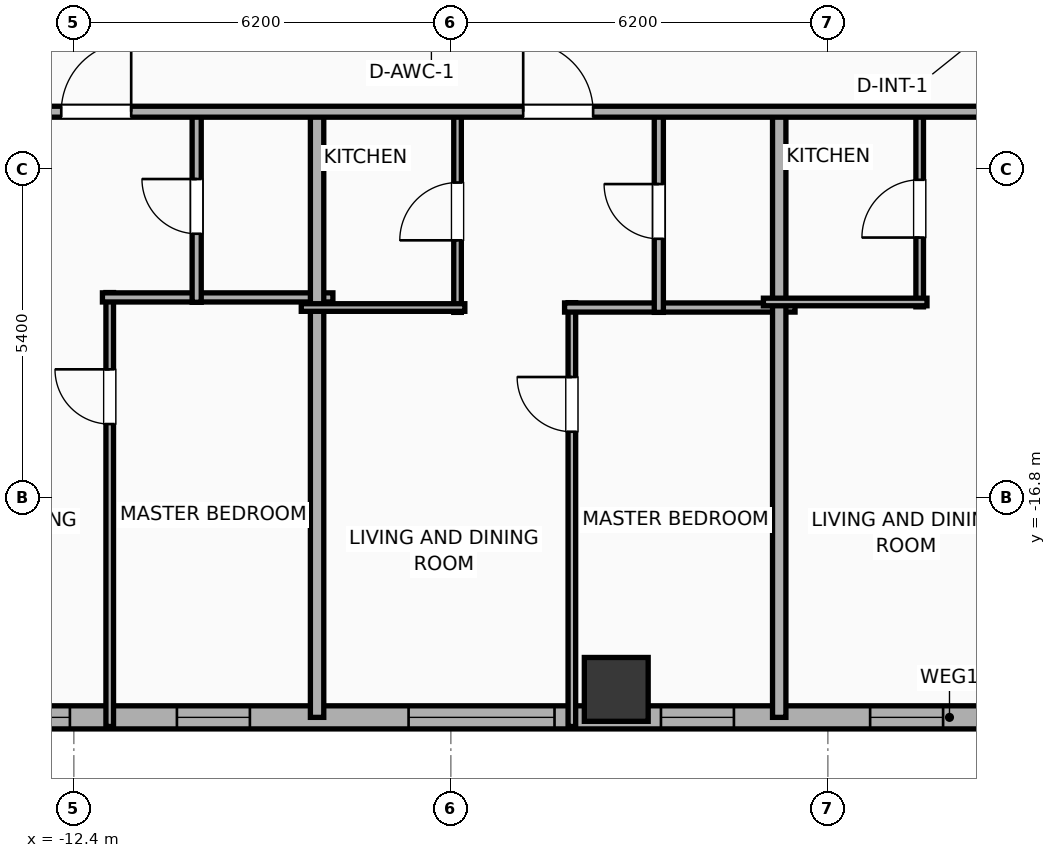
"""IFC4 building model, lengths in metres.
Left out: names, types, materials, properties, quantities, classifications, styles, units other than length and angle.
Written with IfcOpenShell. Run it as: python <this file> out.ifc"""

import sys

from ifc_helpers import new_model, si_unit, direction, frame, frame_2d, origin, origin_2d, place, context, subcontext, project, spatial, rectangle, hollow_rectangle, extrude, element, fill, save


model = new_model("IFC4")
c1 = context("Model", 3, precision=1e-05, world=origin(), true_north=direction((0.0, 1.0)))
c2 = subcontext(c1, "Body", "Model", "MODEL_VIEW")
j1 = project(units=[si_unit("LENGTHUNIT", "METRE"), si_unit("PLANEANGLEUNIT", "RADIAN")], contexts=[c1])
p1 = place(None, origin())
s1 = spatial("IfcSite", under=j1, at=p1, CompositionType="ELEMENT")
p2 = place(p1, origin())
s2 = spatial("IfcBuilding", under=s1, at=p2, CompositionType="ELEMENT")
p3 = place(p2, frame((0.0, 0.0, 93.6)))
s3 = spatial("IfcBuildingStorey", under=s2, at=p3, CompositionType="ELEMENT", Elevation=93.6)
p4 = place(p3, frame((-3.48, -19.95, 0.0), z_axis=(0.0, 0.0, 1.0), x_axis=(1.0, 0.0, 0.0)))
e1 = element("IfcColumn", 1, at=p4, inside=s3, PredefinedType="COLUMN", context=c2, shape_type="SweptSolid", body=[
    extrude(hollow_rectangle(XDim=1.05, YDim=1.05, WallThickness=0.036, at=origin_2d()), origin(), (0.0, 0.0, 1.0), 3.9),
])
p5 = place(p3, frame((29.381, -20.41, 0.0), z_axis=(0.0, 0.0, 1.0), x_axis=(-1.0, 0.0, 0.0)))
e2 = element("IfcWall", 2, at=p5, inside=s3, PredefinedType="ELEMENTEDWALL", context=c2, shape_type="SweptSolid", body=[
    extrude(rectangle(XDim=54.763, YDim=0.38, at=frame_2d((27.381, 0.0))), origin(), (0.0, 0.0, 1.0), 3.65),
])
p6 = place(p5, frame((4.795, 0.0, 0.75)))
e3 = element("IfcOpeningElement", 3, at=p6, cuts=e2, PredefinedType="OPENING", context=c2, shape_type="SweptSolid", body=[
    extrude(rectangle(XDim=2.4, YDim=2.1, at=frame_2d((1.2, 1.05))), frame((0.0, 0.2, 0.0), z_axis=(0.0, -1.0, 0.0), x_axis=(1.0, 0.0, 0.0)), (0.0, 0.0, 1.0), 0.4),
])
p7 = place(p5, frame((33.877, 0.0, 0.75)))
e4 = element("IfcOpeningElement", 4, at=p7, cuts=e2, PredefinedType="OPENING", context=c2, shape_type="SweptSolid", body=[
    extrude(rectangle(XDim=2.4, YDim=2.1, at=frame_2d((1.2, 1.05))), frame((0.0, 0.2, 0.0), z_axis=(0.0, -1.0, 0.0), x_axis=(1.0, 0.0, 0.0)), (0.0, 0.0, 1.0), 0.4),
])
p8 = place(p5, frame((45.867, 0.0, 0.75)))
e5 = element("IfcOpeningElement", 5, at=p8, cuts=e2, PredefinedType="OPENING", context=c2, shape_type="SweptSolid", body=[
    extrude(rectangle(XDim=2.4, YDim=2.1, at=frame_2d((1.2, 1.05))), frame((0.0, 0.2, 0.0), z_axis=(0.0, -1.0, 0.0), x_axis=(1.0, 0.0, 0.0)), (0.0, 0.0, 1.0), 0.4),
])
p9 = place(p5, frame((53.122, 0.0, 0.75)))
e6 = element("IfcOpeningElement", 6, at=p9, cuts=e2, PredefinedType="OPENING", context=c2, shape_type="SweptSolid", body=[
    extrude(rectangle(XDim=0.85, YDim=2.05, at=frame_2d((0.425, 1.025))), frame((0.0, 0.2, 0.0), z_axis=(0.0, -1.0, 0.0), x_axis=(1.0, 0.0, 0.0)), (0.0, 0.0, 1.0), 0.4),
])
p10 = place(p5, frame((50.286, 0.0, 0.75)))
e7 = element("IfcOpeningElement", 7, at=p10, cuts=e2, PredefinedType="OPENING", context=c2, shape_type="SweptSolid", body=[
    extrude(rectangle(XDim=1.2, YDim=2.05, at=frame_2d((0.6, 1.025))), frame((0.0, 0.2, 0.0), z_axis=(0.0, -1.0, 0.0), x_axis=(1.0, 0.0, 0.0)), (0.0, 0.0, 1.0), 0.4),
])
p11 = place(p5, frame((41.846, 0.0, 0.75)))
e8 = element("IfcOpeningElement", 8, at=p11, cuts=e2, PredefinedType="OPENING", context=c2, shape_type="SweptSolid", body=[
    extrude(rectangle(XDim=1.2, YDim=2.05, at=frame_2d((0.6, 1.025))), frame((0.0, 0.2, 0.0), z_axis=(0.0, -1.0, 0.0), x_axis=(1.0, 0.0, 0.0)), (0.0, 0.0, 1.0), 0.4),
])
p12 = place(p5, frame((38.886, 0.0, 0.75)))
e9 = element("IfcOpeningElement", 9, at=p12, cuts=e2, PredefinedType="OPENING", context=c2, shape_type="SweptSolid", body=[
    extrude(rectangle(XDim=1.2, YDim=2.05, at=frame_2d((0.6, 1.025))), frame((0.0, 0.2, 0.0), z_axis=(0.0, -1.0, 0.0), x_axis=(1.0, 0.0, 0.0)), (0.0, 0.0, 1.0), 0.4),
])
p13 = place(p5, frame((30.926, 0.0, 0.75)))
e10 = element("IfcOpeningElement", 10, at=p13, cuts=e2, PredefinedType="OPENING", context=c2, shape_type="SweptSolid", body=[
    extrude(rectangle(XDim=1.2, YDim=2.05, at=frame_2d((0.6, 1.025))), frame((0.0, 0.2, 0.0), z_axis=(0.0, -1.0, 0.0), x_axis=(1.0, 0.0, 0.0)), (0.0, 0.0, 1.0), 0.4),
])
p14 = place(p5, frame((27.486, 0.0, 0.75)))
e11 = element("IfcOpeningElement", 11, at=p14, cuts=e2, PredefinedType="OPENING", context=c2, shape_type="SweptSolid", body=[
    extrude(rectangle(XDim=1.2, YDim=2.05, at=frame_2d((0.6, 1.025))), frame((0.0, 0.2, 0.0), z_axis=(0.0, -1.0, 0.0), x_axis=(1.0, 0.0, 0.0)), (0.0, 0.0, 1.0), 0.4),
])
p15 = place(p5, frame((23.686, 0.0, 0.75)))
e12 = element("IfcOpeningElement", 12, at=p15, cuts=e2, PredefinedType="OPENING", context=c2, shape_type="SweptSolid", body=[
    extrude(rectangle(XDim=1.2, YDim=2.05, at=frame_2d((0.6, 1.025))), frame((0.0, 0.2, 0.0), z_axis=(0.0, -1.0, 0.0), x_axis=(1.0, 0.0, 0.0)), (0.0, 0.0, 1.0), 0.4),
])
p16 = place(p5, frame((19.886, 0.0, 0.75)))
e13 = element("IfcOpeningElement", 13, at=p16, cuts=e2, PredefinedType="OPENING", context=c2, shape_type="SweptSolid", body=[
    extrude(rectangle(XDim=1.2, YDim=2.05, at=frame_2d((0.6, 1.025))), frame((0.0, 0.2, 0.0), z_axis=(0.0, -1.0, 0.0), x_axis=(1.0, 0.0, 0.0)), (0.0, 0.0, 1.0), 0.4),
])
p17 = place(p5, frame((16.086, 0.0, 0.75)))
e14 = element("IfcOpeningElement", 14, at=p17, cuts=e2, PredefinedType="OPENING", context=c2, shape_type="SweptSolid", body=[
    extrude(rectangle(XDim=1.2, YDim=2.05, at=frame_2d((0.6, 1.025))), frame((0.0, 0.2, 0.0), z_axis=(0.0, -1.0, 0.0), x_axis=(1.0, 0.0, 0.0)), (0.0, 0.0, 1.0), 0.4),
])
p18 = place(p5, frame((12.286, 0.0, 0.75)))
e15 = element("IfcOpeningElement", 15, at=p18, cuts=e2, PredefinedType="OPENING", context=c2, shape_type="SweptSolid", body=[
    extrude(rectangle(XDim=1.2, YDim=2.05, at=frame_2d((0.6, 1.025))), frame((0.0, 0.2, 0.0), z_axis=(0.0, -1.0, 0.0), x_axis=(1.0, 0.0, 0.0)), (0.0, 0.0, 1.0), 0.4),
])
p19 = place(p5, frame((8.486, 0.0, 0.75)))
e16 = element("IfcOpeningElement", 16, at=p19, cuts=e2, PredefinedType="OPENING", context=c2, shape_type="SweptSolid", body=[
    extrude(rectangle(XDim=1.2, YDim=2.05, at=frame_2d((0.6, 1.025))), frame((0.0, 0.2, 0.0), z_axis=(0.0, -1.0, 0.0), x_axis=(1.0, 0.0, 0.0)), (0.0, 0.0, 1.0), 0.4),
])
p20 = place(p5, frame((2.277, 0.0, 0.75)))
e17 = element("IfcOpeningElement", 17, at=p20, cuts=e2, PredefinedType="OPENING", context=c2, shape_type="SweptSolid", body=[
    extrude(rectangle(XDim=1.2, YDim=2.05, at=frame_2d((0.6, 1.025))), frame((0.0, 0.2, 0.0), z_axis=(0.0, -1.0, 0.0), x_axis=(1.0, 0.0, 0.0)), (0.0, 0.0, 1.0), 0.4),
])
p21 = place(p5, frame((1.071, 0.0, 0.75)))
e18 = element("IfcOpeningElement", 18, at=p21, cuts=e2, PredefinedType="OPENING", context=c2, shape_type="SweptSolid", body=[
    extrude(rectangle(XDim=0.52, YDim=2.05, at=frame_2d((0.26, 1.025))), frame((0.0, 0.2, 0.0), z_axis=(0.0, -1.0, 0.0), x_axis=(1.0, 0.0, 0.0)), (0.0, 0.0, 1.0), 0.4),
])
p22 = place(p3, frame((-11.81, -20.56, 0.0), z_axis=(0.0, 0.0, 1.0), x_axis=(0.0, 1.0, 0.0)))
e19 = element("IfcWall", 19, at=p22, inside=s3, PredefinedType="PARTITIONING", context=c2, shape_type="SweptSolid", body=[
    extrude(rectangle(XDim=7.136, YDim=0.125, at=frame_2d((3.568, 0.0))), origin(), (0.0, 0.0, 1.0), 3.65),
])
p23 = place(p22, frame((4.973, 0.0, 0.0)))
e20 = element("IfcOpeningElement", 20, at=p23, cuts=e19, PredefinedType="OPENING", context=c2, shape_type="SweptSolid", body=[
    extrude(rectangle(XDim=0.9, YDim=2.05, at=frame_2d((0.45, 1.025))), frame((0.0, 0.073, 0.0), z_axis=(0.0, -1.0, 0.0), x_axis=(1.0, 0.0, 0.0)), (0.0, 0.0, 1.0), 0.145),
])
p24 = place(p3, frame((-11.93, -13.504, 0.0), z_axis=(0.0, 0.0, 1.0), x_axis=(1.0, 0.0, 0.0)))
e21 = element("IfcWall", 21, at=p24, inside=s3, PredefinedType="PLUMBINGWALL", context=c2, shape_type="SweptSolid", body=[
    extrude(rectangle(XDim=3.79, YDim=0.15, at=frame_2d((1.895, 0.0))), origin(), (0.0, 0.0, 1.0), 3.65),
])
p25 = place(p3, frame((-10.38, -13.584, 0.0), z_axis=(0.0, 0.0, 1.0), x_axis=(0.0, 1.0, 0.0)))
e22 = element("IfcWall", 22, at=p25, inside=s3, PredefinedType="PLUMBINGWALL", context=c2, shape_type="SweptSolid", body=[
    extrude(rectangle(XDim=3.154, YDim=0.15, at=frame_2d((1.577, 0.0))), origin(), (0.0, 0.0, 1.0), 3.65),
])
p26 = place(p25, frame((1.127, 0.0, 0.0)))
e23 = element("IfcOpeningElement", 23, at=p26, cuts=e22, PredefinedType="OPENING", context=c2, shape_type="SweptSolid", body=[
    extrude(rectangle(XDim=0.9, YDim=2.05, at=frame_2d((0.45, 1.025))), frame((0.0, 0.085, 0.0), z_axis=(0.0, -1.0, 0.0), x_axis=(1.0, 0.0, 0.0)), (0.0, 0.0, 1.0), 0.17),
])
p27 = place(p3, frame((-8.4, -20.41, 0.0), z_axis=(0.0, 0.0, 1.0), x_axis=(0.0, 1.0, 0.0)))
e24 = element("IfcWall", 24, at=p27, inside=s3, PredefinedType="PARTITIONING", context=c2, shape_type="SweptSolid", body=[
    extrude(rectangle(XDim=10.04, YDim=0.22, at=frame_2d((5.02, 0.0))), origin(), (0.0, 0.0, 1.0), 3.65),
])
p28 = place(p3, frame((-4.21, -20.56, 0.0), z_axis=(0.0, 0.0, 1.0), x_axis=(0.0, 1.0, 0.0)))
e25 = element("IfcWall", 25, at=p28, inside=s3, PredefinedType="PARTITIONING", context=c2, shape_type="SweptSolid", body=[
    extrude(rectangle(XDim=6.97, YDim=0.125, at=frame_2d((3.485, 0.0))), origin(), (0.0, 0.0, 1.0), 3.65),
])
p29 = place(p28, frame((4.847, 0.0, 0.0)))
e26 = element("IfcOpeningElement", 26, at=p29, cuts=e25, PredefinedType="OPENING", context=c2, shape_type="SweptSolid", body=[
    extrude(rectangle(XDim=0.9, YDim=2.05, at=frame_2d((0.45, 1.025))), frame((0.0, 0.073, 0.0), z_axis=(0.0, -1.0, 0.0), x_axis=(1.0, 0.0, 0.0)), (0.0, 0.0, 1.0), 0.145),
])
p30 = place(p3, frame((-4.33, -13.67, 0.0), z_axis=(0.0, 0.0, 1.0), x_axis=(1.0, 0.0, 0.0)))
e27 = element("IfcWall", 27, at=p30, inside=s3, PredefinedType="PLUMBINGWALL", context=c2, shape_type="SweptSolid", body=[
    extrude(rectangle(XDim=3.79, YDim=0.15, at=frame_2d((1.895, 0.0))), origin(), (0.0, 0.0, 1.0), 3.65),
])
p31 = place(p3, frame((-6.09, -13.75, 0.0), z_axis=(0.0, 0.0, 1.0), x_axis=(0.0, 1.0, 0.0)))
e28 = element("IfcWall", 28, at=p31, inside=s3, PredefinedType="PARTITIONING", context=c2, shape_type="SweptSolid", body=[
    extrude(rectangle(XDim=3.32, YDim=0.125, at=frame_2d((1.66, 0.0))), origin(), (0.0, 0.0, 1.0), 3.65),
])
p32 = place(p31, frame((1.185, 0.0, 0.0)))
e29 = element("IfcOpeningElement", 29, at=p32, cuts=e28, PredefinedType="OPENING", context=c2, shape_type="SweptSolid", body=[
    extrude(rectangle(XDim=0.95, YDim=2.05, at=frame_2d((0.475, 1.025))), frame((0.0, 0.073, 0.0), z_axis=(0.0, -1.0, 0.0), x_axis=(1.0, 0.0, 0.0)), (0.0, 0.0, 1.0), 0.145),
])
p33 = place(p3, frame((-8.66, -13.67, 0.0), z_axis=(0.0, 0.0, 1.0), x_axis=(1.0, 0.0, 0.0)))
e30 = element("IfcWall", 30, at=p33, inside=s3, PredefinedType="PARTITIONING", context=c2, shape_type="SweptSolid", body=[
    extrude(rectangle(XDim=2.69, YDim=0.125, at=frame_2d((1.345, 0.0))), origin(), (0.0, 0.0, 1.0), 3.65),
])
p34 = place(p3, frame((-2.78, -13.75, 0.0), z_axis=(0.0, 0.0, 1.0), x_axis=(0.0, 1.0, 0.0)))
e31 = element("IfcWall", 31, at=p34, inside=s3, PredefinedType="PLUMBINGWALL", context=c2, shape_type="SweptSolid", body=[
    extrude(rectangle(XDim=3.32, YDim=0.15, at=frame_2d((1.66, 0.0))), origin(), (0.0, 0.0, 1.0), 3.65),
])
p35 = place(p34, frame((1.21, 0.0, 0.0)))
e32 = element("IfcOpeningElement", 32, at=p35, cuts=e31, PredefinedType="OPENING", context=c2, shape_type="SweptSolid", body=[
    extrude(rectangle(XDim=0.9, YDim=2.05, at=frame_2d((0.45, 1.025))), frame((0.0, 0.085, 0.0), z_axis=(0.0, -1.0, 0.0), x_axis=(1.0, 0.0, 0.0)), (0.0, 0.0, 1.0), 0.17),
])
p36 = place(p3, frame((-0.8, -20.41, 0.0), z_axis=(0.0, 0.0, 1.0), x_axis=(0.0, 1.0, 0.0)))
e33 = element("IfcWall", 33, at=p36, inside=s3, PredefinedType="PARTITIONING", context=c2, shape_type="SweptSolid", body=[
    extrude(rectangle(XDim=10.04, YDim=0.22, at=frame_2d((5.02, 0.0))), origin(), (0.0, 0.0, 1.0), 3.65),
])
p37 = place(p3, frame((1.51, -13.659, 0.0), z_axis=(0.0, 0.0, 1.0), x_axis=(0.0, 1.0, 0.0)))
e34 = element("IfcWall", 34, at=p37, inside=s3, PredefinedType="PARTITIONING", context=c2, shape_type="SweptSolid", body=[
    extrude(rectangle(XDim=3.229, YDim=0.125, at=frame_2d((1.615, 0.0))), origin(), (0.0, 0.0, 1.0), 3.65),
])
p38 = place(p37, frame((1.139, 0.0, 0.0)))
e35 = element("IfcOpeningElement", 35, at=p38, cuts=e34, PredefinedType="OPENING", context=c2, shape_type="SweptSolid", body=[
    extrude(rectangle(XDim=0.95, YDim=2.05, at=frame_2d((0.475, 1.025))), frame((0.0, 0.073, 0.0), z_axis=(0.0, -1.0, 0.0), x_axis=(1.0, 0.0, 0.0)), (0.0, 0.0, 1.0), 0.145),
])
p39 = place(p3, frame((-1.06, -13.579, 0.0), z_axis=(0.0, 0.0, 1.0), x_axis=(1.0, 0.0, 0.0)))
e36 = element("IfcWall", 36, at=p39, inside=s3, PredefinedType="PARTITIONING", context=c2, shape_type="SweptSolid", body=[
    extrude(rectangle(XDim=2.69, YDim=0.125, at=frame_2d((1.345, 0.0))), origin(), (0.0, 0.0, 1.0), 3.65),
])
p40 = place(p3, frame((-29.21, -10.45, 0.0), z_axis=(0.0, 0.0, 1.0), x_axis=(1.0, 0.0, 0.0)))
e37 = element("IfcWall", 37, at=p40, inside=s3, PredefinedType="PARTITIONING", context=c2, shape_type="SweptSolid", body=[
    extrude(rectangle(XDim=62.42, YDim=0.18, at=frame_2d((31.21, 0.0))), origin(), (0.0, 0.0, 1.0), 3.65),
])
p41 = place(p40, frame((2.502, 0.0, 0.0)))
e38 = element("IfcOpeningElement", 38, at=p41, cuts=e37, PredefinedType="OPENING", context=c2, shape_type="SweptSolid", body=[
    extrude(rectangle(XDim=0.9, YDim=2.05, at=frame_2d((0.45, 1.025))), frame((0.0, 0.1, 0.0), z_axis=(0.0, -1.0, 0.0), x_axis=(1.0, 0.0, 0.0)), (0.0, 0.0, 1.0), 0.2),
])
p42 = place(p40, frame((9.0, 0.0, 0.0)))
e39 = element("IfcOpeningElement", 39, at=p42, cuts=e37, PredefinedType="OPENING", context=c2, shape_type="SweptSolid", body=[
    extrude(rectangle(XDim=1.15, YDim=2.05, at=frame_2d((0.575, 1.025))), frame((0.0, 0.1, 0.0), z_axis=(0.0, -1.0, 0.0), x_axis=(1.0, 0.0, 0.0)), (0.0, 0.0, 1.0), 0.2),
])
p43 = place(p40, frame((16.603, 0.0, 0.0)))
e40 = element("IfcOpeningElement", 40, at=p43, cuts=e37, PredefinedType="OPENING", context=c2, shape_type="SweptSolid", body=[
    extrude(rectangle(XDim=1.15, YDim=2.05, at=frame_2d((0.575, 1.025))), frame((0.0, 0.1, 0.0), z_axis=(0.0, -1.0, 0.0), x_axis=(1.0, 0.0, 0.0)), (0.0, 0.0, 1.0), 0.2),
])
p44 = place(p40, frame((24.199, 0.0, 0.0)))
e41 = element("IfcOpeningElement", 41, at=p44, cuts=e37, PredefinedType="OPENING", context=c2, shape_type="SweptSolid", body=[
    extrude(rectangle(XDim=1.15, YDim=2.05, at=frame_2d((0.575, 1.025))), frame((0.0, 0.1, 0.0), z_axis=(0.0, -1.0, 0.0), x_axis=(1.0, 0.0, 0.0)), (0.0, 0.0, 1.0), 0.2),
])
p45 = place(p40, frame((31.802, 0.0, 0.0)))
e42 = element("IfcOpeningElement", 42, at=p45, cuts=e37, PredefinedType="OPENING", context=c2, shape_type="SweptSolid", body=[
    extrude(rectangle(XDim=1.15, YDim=2.05, at=frame_2d((0.575, 1.025))), frame((0.0, 0.1, 0.0), z_axis=(0.0, -1.0, 0.0), x_axis=(1.0, 0.0, 0.0)), (0.0, 0.0, 1.0), 0.2),
])
p46 = place(p40, frame((39.399, 0.0, 0.0)))
e43 = element("IfcOpeningElement", 43, at=p46, cuts=e37, PredefinedType="OPENING", context=c2, shape_type="SweptSolid", body=[
    extrude(rectangle(XDim=1.15, YDim=2.05, at=frame_2d((0.575, 1.025))), frame((0.0, 0.1, 0.0), z_axis=(0.0, -1.0, 0.0), x_axis=(1.0, 0.0, 0.0)), (0.0, 0.0, 1.0), 0.2),
])
p47 = place(p40, frame((47.001, 0.0, 0.0)))
e44 = element("IfcOpeningElement", 44, at=p47, cuts=e37, PredefinedType="OPENING", context=c2, shape_type="SweptSolid", body=[
    extrude(rectangle(XDim=1.15, YDim=2.05, at=frame_2d((0.575, 1.025))), frame((0.0, 0.1, 0.0), z_axis=(0.0, -1.0, 0.0), x_axis=(1.0, 0.0, 0.0)), (0.0, 0.0, 1.0), 0.2),
])
p48 = place(p40, frame((52.363, 0.0, 0.0)))
e45 = element("IfcOpeningElement", 45, at=p48, cuts=e37, PredefinedType="OPENING", context=c2, shape_type="SweptSolid", body=[
    extrude(rectangle(XDim=1.15, YDim=2.05, at=frame_2d((0.575, 1.025))), frame((0.0, 0.1, 0.0), z_axis=(0.0, -1.0, 0.0), x_axis=(1.0, 0.0, 0.0)), (0.0, 0.0, 1.0), 0.2),
])
p49 = place(p40, frame((59.386, 0.0, 0.0)))
e46 = element("IfcOpeningElement", 46, at=p49, cuts=e37, PredefinedType="OPENING", context=c2, shape_type="SweptSolid", body=[
    extrude(rectangle(XDim=0.9, YDim=2.05, at=frame_2d((0.45, 1.025))), frame((0.0, 0.1, 0.0), z_axis=(0.0, -1.0, 0.0), x_axis=(1.0, 0.0, 0.0)), (0.0, 0.0, 1.0), 0.2),
])
p50 = place(p7, origin())
e47 = element("IfcWindow", 47, at=p50, inside=s3, PartitioningType="SINGLE_PANEL", PredefinedType="WINDOW", context=c2, shape_type="SweptSolid", body=[
    extrude(rectangle(XDim=2.4, YDim=2.1, at=frame_2d((1.2, 1.05))), frame((0.0, 0.03, 0.0), z_axis=(0.0, -1.0, 0.0), x_axis=(1.0, 0.0, 0.0)), (0.0, 0.0, 1.0), 0.06),
])
fill(e4, e47)
p51 = place(p11, origin())
e48 = element("IfcWindow", 48, at=p51, inside=s3, PartitioningType="SINGLE_PANEL", PredefinedType="WINDOW", context=c2, shape_type="SweptSolid", body=[
    extrude(rectangle(XDim=1.2, YDim=2.05, at=frame_2d((0.6, 1.025))), frame((0.0, 0.03, 0.0), z_axis=(0.0, -1.0, 0.0), x_axis=(1.0, 0.0, 0.0)), (0.0, 0.0, 1.0), 0.06),
])
fill(e8, e48)
p52 = place(p12, origin())
e49 = element("IfcWindow", 49, at=p52, inside=s3, PartitioningType="SINGLE_PANEL", PredefinedType="WINDOW", context=c2, shape_type="SweptSolid", body=[
    extrude(rectangle(XDim=1.2, YDim=2.05, at=frame_2d((0.6, 1.025))), frame((0.0, 0.03, 0.0), z_axis=(0.0, -1.0, 0.0), x_axis=(1.0, 0.0, 0.0)), (0.0, 0.0, 1.0), 0.06),
])
fill(e9, e49)
p53 = place(p13, origin())
e50 = element("IfcWindow", 50, at=p53, inside=s3, PartitioningType="SINGLE_PANEL", PredefinedType="WINDOW", context=c2, shape_type="SweptSolid", body=[
    extrude(rectangle(XDim=1.2, YDim=2.05, at=frame_2d((0.6, 1.025))), frame((0.0, 0.03, 0.0), z_axis=(0.0, -1.0, 0.0), x_axis=(1.0, 0.0, 0.0)), (0.0, 0.0, 1.0), 0.06),
])
fill(e10, e50)
p54 = place(p14, origin())
e51 = element("IfcWindow", 51, at=p54, inside=s3, PartitioningType="SINGLE_PANEL", PredefinedType="WINDOW", context=c2, shape_type="SweptSolid", body=[
    extrude(rectangle(XDim=1.2, YDim=2.05, at=frame_2d((0.6, 1.025))), frame((0.0, 0.03, 0.0), z_axis=(0.0, -1.0, 0.0), x_axis=(1.0, 0.0, 0.0)), (0.0, 0.0, 1.0), 0.06),
])
fill(e11, e51)
p55 = place(p23, origin())
e52 = element("IfcDoor", 52, at=p55, inside=s3, OperationType="SINGLE_SWING_RIGHT", PredefinedType="DOOR", context=c2, shape_type="SweptSolid", body=[
    extrude(rectangle(XDim=0.9, YDim=2.05, at=frame_2d((0.45, 1.025))), frame((0.0, 0.025, 0.0), z_axis=(0.0, -1.0, 0.0), x_axis=(1.0, 0.0, 0.0)), (0.0, 0.0, 1.0), 0.05),
])
fill(e20, e52)
p56 = place(p26, origin())
e53 = element("IfcDoor", 53, at=p56, inside=s3, OperationType="SINGLE_SWING_RIGHT", PredefinedType="DOOR", context=c2, shape_type="SweptSolid", body=[
    extrude(rectangle(XDim=0.9, YDim=2.05, at=frame_2d((0.45, 1.025))), frame((0.0, 0.025, 0.0), z_axis=(0.0, -1.0, 0.0), x_axis=(1.0, 0.0, 0.0)), (0.0, 0.0, 1.0), 0.05),
])
fill(e23, e53)
p57 = place(p29, origin())
e54 = element("IfcDoor", 54, at=p57, inside=s3, OperationType="SINGLE_SWING_RIGHT", PredefinedType="DOOR", context=c2, shape_type="SweptSolid", body=[
    extrude(rectangle(XDim=0.9, YDim=2.05, at=frame_2d((0.45, 1.025))), frame((0.0, 0.025, 0.0), z_axis=(0.0, -1.0, 0.0), x_axis=(1.0, 0.0, 0.0)), (0.0, 0.0, 1.0), 0.05),
])
fill(e26, e54)
p58 = place(p32, origin())
e55 = element("IfcDoor", 55, at=p58, inside=s3, OperationType="SINGLE_SWING_LEFT", PredefinedType="DOOR", context=c2, shape_type="SweptSolid", body=[
    extrude(rectangle(XDim=0.95, YDim=2.05, at=frame_2d((0.475, 1.025))), frame((0.0, 0.025, 0.0), z_axis=(0.0, -1.0, 0.0), x_axis=(1.0, 0.0, 0.0)), (0.0, 0.0, 1.0), 0.05),
])
fill(e29, e55)
p59 = place(p35, origin())
e56 = element("IfcDoor", 56, at=p59, inside=s3, OperationType="SINGLE_SWING_RIGHT", PredefinedType="DOOR", context=c2, shape_type="SweptSolid", body=[
    extrude(rectangle(XDim=0.9, YDim=2.05, at=frame_2d((0.45, 1.025))), frame((0.0, 0.025, 0.0), z_axis=(0.0, -1.0, 0.0), x_axis=(1.0, 0.0, 0.0)), (0.0, 0.0, 1.0), 0.05),
])
fill(e32, e56)
p60 = place(p38, origin())
e57 = element("IfcDoor", 57, at=p60, inside=s3, OperationType="SINGLE_SWING_LEFT", PredefinedType="DOOR", context=c2, shape_type="SweptSolid", body=[
    extrude(rectangle(XDim=0.95, YDim=2.05, at=frame_2d((0.475, 1.025))), frame((0.0, 0.025, 0.0), z_axis=(0.0, -1.0, 0.0), x_axis=(1.0, 0.0, 0.0)), (0.0, 0.0, 1.0), 0.05),
])
fill(e35, e57)
p61 = place(p43, origin())
e58 = element("IfcDoor", 58, at=p61, inside=s3, OperationType="SINGLE_SWING_RIGHT", PredefinedType="DOOR", context=c2, shape_type="SweptSolid", body=[
    extrude(rectangle(XDim=1.15, YDim=2.05, at=frame_2d((0.575, 1.025))), frame((0.0, 0.025, 0.0), z_axis=(0.0, -1.0, 0.0), x_axis=(1.0, 0.0, 0.0)), (0.0, 0.0, 1.0), 0.05),
])
fill(e40, e58)
p62 = place(p44, origin())
e59 = element("IfcDoor", 59, at=p62, inside=s3, OperationType="SINGLE_SWING_LEFT", PredefinedType="DOOR", context=c2, shape_type="SweptSolid", body=[
    extrude(rectangle(XDim=1.15, YDim=2.05, at=frame_2d((0.575, 1.025))), frame((0.0, 0.025, 0.0), z_axis=(0.0, -1.0, 0.0), x_axis=(1.0, 0.0, 0.0)), (0.0, 0.0, 1.0), 0.05),
])
fill(e41, e59)
save(model, sys.argv[1])
